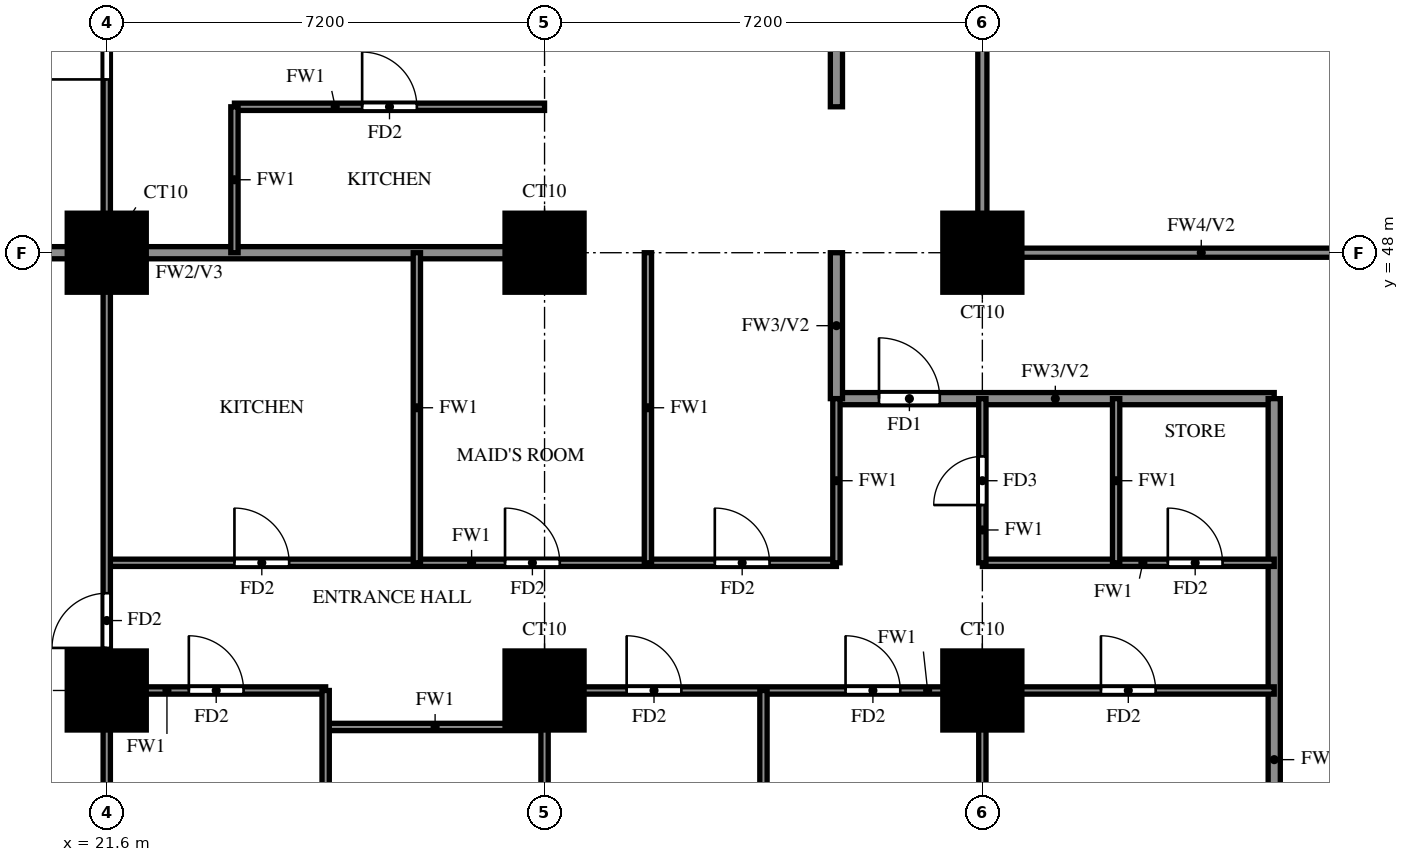
"""IFC4 building model, lengths in metres.
Left out: names, types, materials, properties, quantities, classifications, styles, units other than length and angle.
Written with IfcOpenShell. Run it as: python <this file> out.ifc"""

import sys

from ifc_helpers import new_model, si_unit, direction, frame, frame_2d, origin, origin_2d, place, context, subcontext, project, spatial, rectangle, extrude, source, transform, mapped, element, fill, save


model = new_model("IFC4")
c1 = context("Model", 3, precision=1e-05, world=origin(), true_north=direction((0.0, 1.0)))
c2 = subcontext(c1, "Body", "Model", "MODEL_VIEW")
j1 = project(units=[si_unit("LENGTHUNIT", "METRE"), si_unit("PLANEANGLEUNIT", "RADIAN")], contexts=[c1])
p1 = place(None, origin())
s1 = spatial("IfcSite", under=j1, at=p1, CompositionType="ELEMENT")
p2 = place(p1, origin())
s2 = spatial("IfcBuilding", under=s1, at=p2, CompositionType="ELEMENT")
p3 = place(p2, frame((0.0, 0.0, 76.0)))
s3 = spatial("IfcBuildingStorey", under=s2, at=p3, CompositionType="ELEMENT", Elevation=76.0)
m1 = source(origin(), c2, "Body", "SweptSolid", [
    extrude(rectangle(XDim=1.3, YDim=1.3, at=origin_2d()), origin(), (0.0, 0.0, 1.0), 3.18),
])
for number, where, z_axis, x_axis in (
    (1, (21.6, 40.8, 0.0), (0.0, 0.0, 1.0), (1.0, 0.0, 0.0)),
    (2, (28.8, 40.8, 0.0), (0.0, 0.0, 1.0), (1.0, 0.0, 0.0)),
    (3, (36.0, 40.8, 0.0), (0.0, 0.0, 1.0), (1.0, 0.0, 0.0)),
    (4, (21.6, 48.0, 0.0), (0.0, 0.0, 1.0), (1.0, 0.0, 0.0)),
    (5, (28.8, 48.0, 0.0), (0.0, 0.0, 1.0), (1.0, 0.0, 0.0)),
    (6, (36.0, 48.0, 0.0), (0.0, 0.0, 1.0), (1.0, 0.0, 0.0)),
):
    element("IfcColumn", number, at=place(p3, frame(where, z_axis=z_axis, x_axis=x_axis)), inside=s3, PredefinedType="COLUMN", context=c2, shape_type="MappedRepresentation", body=[
        mapped(m1, transform((0.0, 0.0, 0.0))),
    ])
p4 = place(p3, frame((33.6, 45.6, 0.0), z_axis=(0.0, 0.0, 1.0), x_axis=(1.0, 0.0, 0.0)))
e7 = element("IfcWall", 7, at=p4, inside=s3, PredefinedType="SOLIDWALL", context=c2, shape_type="SweptSolid", body=[
    extrude(rectangle(XDim=7.2, YDim=0.2, at=frame_2d((3.6, 0.0))), origin(), (0.0, 0.0, 1.0), 3.18),
])
p5 = place(p4, frame((0.7, 0.0, 0.0)))
e8 = element("IfcOpeningElement", 8, at=p5, cuts=e7, PredefinedType="OPENING", context=c2, shape_type="SweptSolid", body=[
    extrude(rectangle(XDim=1.0, YDim=2.1, at=frame_2d((0.5, 1.05))), frame((0.0, 0.11, 0.0), z_axis=(0.0, -1.0, 0.0), x_axis=(1.0, 0.0, 0.0)), (0.0, 0.0, 1.0), 0.22),
])
p6 = place(p3, frame((33.6, 45.6, 0.0), z_axis=(0.0, 0.0, 1.0), x_axis=(0.0, 1.0, 0.0)))
e9 = element("IfcWall", 9, at=p6, inside=s3, PredefinedType="SOLIDWALL", context=c2, shape_type="SweptSolid", body=[
    extrude(rectangle(XDim=2.4, YDim=0.2, at=frame_2d((1.2, 0.0))), origin(), (0.0, 0.0, 1.0), 3.18),
])
p7 = place(p3, frame((33.6, 50.4, 0.0), z_axis=(0.0, 0.0, 1.0), x_axis=(0.0, 1.0, 0.0)))
e10 = element("IfcWall", 10, at=p7, inside=s3, PredefinedType="SOLIDWALL", context=c2, shape_type="SweptSolid", body=[
    extrude(rectangle(XDim=9.6, YDim=0.2, at=frame_2d((4.8, 0.0))), origin(), (0.0, 0.0, 1.0), 3.18),
])
p8 = place(p3, frame((40.8, 33.725, 0.0), z_axis=(0.0, 0.0, 1.0), x_axis=(0.0, 1.0, 0.0)))
e11 = element("IfcWall", 11, at=p8, inside=s3, PredefinedType="SOLIDWALL", context=c2, shape_type="SweptSolid", body=[
    extrude(rectangle(XDim=11.875, YDim=0.2, at=frame_2d((5.938, 0.0))), origin(), (0.0, 0.0, 1.0), 2.28),
])
p9 = place(p3, frame((14.525, 48.0, 0.0), z_axis=(0.0, 0.0, 1.0), x_axis=(1.0, 0.0, 0.0)))
e12 = element("IfcWall", 12, at=p9, inside=s3, PredefinedType="SOLIDWALL", context=c2, shape_type="SweptSolid", body=[
    extrude(rectangle(XDim=14.275, YDim=0.2, at=frame_2d((7.138, 0.0))), origin(), (0.0, 0.0, 1.0), 3.18),
])
p10 = place(p3, frame((25.2, 40.2, 0.0), z_axis=(0.0, 0.0, 1.0), x_axis=(1.0, 0.0, 0.0)))
e13 = element("IfcWall", 13, at=p10, inside=s3, PredefinedType="PARTITIONING", context=c2, shape_type="SweptSolid", body=[
    extrude(rectangle(XDim=3.6, YDim=0.12, at=frame_2d((1.8, 0.0))), origin(), (0.0, 0.0, 1.0), 3.18),
])
p11 = place(p3, frame((21.6, 40.8, 0.0), z_axis=(0.0, 0.0, 1.0), x_axis=(1.0, 0.0, 0.0)))
e14 = element("IfcWall", 14, at=p11, inside=s3, PredefinedType="PARTITIONING", context=c2, shape_type="SweptSolid", body=[
    extrude(rectangle(XDim=3.6, YDim=0.12, at=frame_2d((1.8, 0.0))), origin(), (0.0, 0.0, 1.0), 3.18),
])
p12 = place(p11, frame((1.35, 0.0, 0.0)))
e15 = element("IfcOpeningElement", 15, at=p12, cuts=e14, PredefinedType="OPENING", context=c2, shape_type="SweptSolid", body=[
    extrude(rectangle(XDim=0.9, YDim=2.1, at=frame_2d((0.45, 1.05))), frame((0.0, 0.07, 0.0), z_axis=(0.0, -1.0, 0.0), x_axis=(1.0, 0.0, 0.0)), (0.0, 0.0, 1.0), 0.14),
])
p13 = place(p3, frame((28.8, 40.8, 0.0), z_axis=(0.0, 0.0, 1.0), x_axis=(1.0, 0.0, 0.0)))
e16 = element("IfcWall", 16, at=p13, inside=s3, PredefinedType="PARTITIONING", context=c2, shape_type="SweptSolid", body=[
    extrude(rectangle(XDim=12.0, YDim=0.12, at=frame_2d((6.0, 0.0))), origin(), (0.0, 0.0, 1.0), 3.18),
])
p14 = place(p13, frame((1.35, 0.0, 0.0)))
e17 = element("IfcOpeningElement", 17, at=p14, cuts=e16, PredefinedType="OPENING", context=c2, shape_type="SweptSolid", body=[
    extrude(rectangle(XDim=0.9, YDim=2.1, at=frame_2d((0.45, 1.05))), frame((0.0, 0.07, 0.0), z_axis=(0.0, -1.0, 0.0), x_axis=(1.0, 0.0, 0.0)), (0.0, 0.0, 1.0), 0.14),
])
p15 = place(p13, frame((4.95, 0.0, 0.0)))
e18 = element("IfcOpeningElement", 18, at=p15, cuts=e16, PredefinedType="OPENING", context=c2, shape_type="SweptSolid", body=[
    extrude(rectangle(XDim=0.9, YDim=2.1, at=frame_2d((0.45, 1.05))), frame((0.0, 0.07, 0.0), z_axis=(0.0, -1.0, 0.0), x_axis=(1.0, 0.0, 0.0)), (0.0, 0.0, 1.0), 0.14),
])
p16 = place(p13, frame((9.15, 0.0, 0.0)))
e19 = element("IfcOpeningElement", 19, at=p16, cuts=e16, PredefinedType="OPENING", context=c2, shape_type="SweptSolid", body=[
    extrude(rectangle(XDim=0.9, YDim=2.1, at=frame_2d((0.45, 1.05))), frame((0.0, 0.07, 0.0), z_axis=(0.0, -1.0, 0.0), x_axis=(1.0, 0.0, 0.0)), (0.0, 0.0, 1.0), 0.14),
])
p17 = place(p3, frame((21.6, 42.9, 0.0), z_axis=(0.0, 0.0, 1.0), x_axis=(1.0, 0.0, 0.0)))
e20 = element("IfcWall", 20, at=p17, inside=s3, PredefinedType="PARTITIONING", context=c2, shape_type="SweptSolid", body=[
    extrude(rectangle(XDim=12.0, YDim=0.12, at=frame_2d((6.0, 0.0))), origin(), (0.0, 0.0, 1.0), 3.18),
])
p18 = place(p17, frame((2.1, 0.0, 0.0)))
e21 = element("IfcOpeningElement", 21, at=p18, cuts=e20, PredefinedType="OPENING", context=c2, shape_type="SweptSolid", body=[
    extrude(rectangle(XDim=0.9, YDim=2.1, at=frame_2d((0.45, 1.05))), frame((0.0, 0.07, 0.0), z_axis=(0.0, -1.0, 0.0), x_axis=(1.0, 0.0, 0.0)), (0.0, 0.0, 1.0), 0.14),
])
p19 = place(p17, frame((6.55, 0.0, 0.0)))
e22 = element("IfcOpeningElement", 22, at=p19, cuts=e20, PredefinedType="OPENING", context=c2, shape_type="SweptSolid", body=[
    extrude(rectangle(XDim=0.9, YDim=2.1, at=frame_2d((0.45, 1.05))), frame((0.0, 0.07, 0.0), z_axis=(0.0, -1.0, 0.0), x_axis=(1.0, 0.0, 0.0)), (0.0, 0.0, 1.0), 0.14),
])
p20 = place(p17, frame((10.0, 0.0, 0.0)))
e23 = element("IfcOpeningElement", 23, at=p20, cuts=e20, PredefinedType="OPENING", context=c2, shape_type="SweptSolid", body=[
    extrude(rectangle(XDim=0.9, YDim=2.1, at=frame_2d((0.45, 1.05))), frame((0.0, 0.07, 0.0), z_axis=(0.0, -1.0, 0.0), x_axis=(1.0, 0.0, 0.0)), (0.0, 0.0, 1.0), 0.14),
])
p21 = place(p3, frame((36.0, 42.9, 0.0), z_axis=(0.0, 0.0, 1.0), x_axis=(1.0, 0.0, 0.0)))
e24 = element("IfcWall", 24, at=p21, inside=s3, PredefinedType="PARTITIONING", context=c2, shape_type="SweptSolid", body=[
    extrude(rectangle(XDim=4.8, YDim=0.12, at=frame_2d((2.4, 0.0))), origin(), (0.0, 0.0, 1.0), 3.18),
])
p22 = place(p21, frame((3.05, 0.0, 0.0)))
e25 = element("IfcOpeningElement", 25, at=p22, cuts=e24, PredefinedType="OPENING", context=c2, shape_type="SweptSolid", body=[
    extrude(rectangle(XDim=0.9, YDim=2.1, at=frame_2d((0.45, 1.05))), frame((0.0, 0.07, 0.0), z_axis=(0.0, -1.0, 0.0), x_axis=(1.0, 0.0, 0.0)), (0.0, 0.0, 1.0), 0.14),
])
p23 = place(p3, frame((23.7, 50.4, 0.0), z_axis=(0.0, 0.0, 1.0), x_axis=(1.0, 0.0, 0.0)))
e26 = element("IfcWall", 26, at=p23, inside=s3, PredefinedType="PARTITIONING", context=c2, shape_type="SweptSolid", body=[
    extrude(rectangle(XDim=5.1, YDim=0.12, at=frame_2d((2.55, 0.0))), origin(), (0.0, 0.0, 1.0), 3.18),
])
p24 = place(p23, frame((2.1, 0.0, 0.0)))
e27 = element("IfcOpeningElement", 27, at=p24, cuts=e26, PredefinedType="OPENING", context=c2, shape_type="SweptSolid", body=[
    extrude(rectangle(XDim=0.9, YDim=2.1, at=frame_2d((0.45, 1.05))), frame((0.0, 0.07, 0.0), z_axis=(0.0, -1.0, 0.0), x_axis=(1.0, 0.0, 0.0)), (0.0, 0.0, 1.0), 0.14),
])
p25 = place(p3, frame((21.6, 33.725, 0.0), z_axis=(0.0, 0.0, 1.0), x_axis=(0.0, 1.0, 0.0)))
e28 = element("IfcWall", 28, at=p25, inside=s3, PredefinedType="PARTITIONING", context=c2, shape_type="SweptSolid", body=[
    extrude(rectangle(XDim=39.475, YDim=0.12, at=frame_2d((19.737, 0.0))), origin(), (0.0, 0.0, 1.0), 3.18),
])
p26 = place(p25, frame((7.775, 0.0, 0.0)))
e29 = element("IfcOpeningElement", 29, at=p26, cuts=e28, PredefinedType="OPENING", context=c2, shape_type="SweptSolid", body=[
    extrude(rectangle(XDim=0.9, YDim=2.1, at=frame_2d((0.45, 1.05))), frame((0.0, 0.07, 0.0), z_axis=(0.0, -1.0, 0.0), x_axis=(1.0, 0.0, 0.0)), (0.0, 0.0, 1.0), 0.14),
])
p27 = place(p25, frame((17.125, 0.0, 0.0)))
e30 = element("IfcOpeningElement", 30, at=p27, cuts=e28, PredefinedType="OPENING", context=c2, shape_type="SweptSolid", body=[
    extrude(rectangle(XDim=1.5, YDim=2.1, at=frame_2d((0.75, 1.05))), frame((0.0, 0.07, 0.0), z_axis=(0.0, -1.0, 0.0), x_axis=(1.0, 0.0, 0.0)), (0.0, 0.0, 1.0), 0.14),
])
p28 = place(p25, frame((22.825, 0.0, 0.0)))
e31 = element("IfcOpeningElement", 31, at=p28, cuts=e28, PredefinedType="OPENING", context=c2, shape_type="SweptSolid", body=[
    extrude(rectangle(XDim=0.9, YDim=2.1, at=frame_2d((0.45, 1.05))), frame((0.0, 0.07, 0.0), z_axis=(0.0, -1.0, 0.0), x_axis=(1.0, 0.0, 0.0)), (0.0, 0.0, 1.0), 0.14),
])
p29 = place(p25, frame((26.425, 0.0, 0.0)))
e32 = element("IfcOpeningElement", 32, at=p29, cuts=e28, PredefinedType="OPENING", context=c2, shape_type="SweptSolid", body=[
    extrude(rectangle(XDim=0.9, YDim=2.1, at=frame_2d((0.45, 1.05))), frame((0.0, 0.07, 0.0), z_axis=(0.0, -1.0, 0.0), x_axis=(1.0, 0.0, 0.0)), (0.0, 0.0, 1.0), 0.14),
])
p30 = place(p25, frame((30.025, 0.0, 0.0)))
e33 = element("IfcOpeningElement", 33, at=p30, cuts=e28, PredefinedType="OPENING", context=c2, shape_type="SweptSolid", body=[
    extrude(rectangle(XDim=0.9, YDim=2.1, at=frame_2d((0.45, 1.05))), frame((0.0, 0.07, 0.0), z_axis=(0.0, -1.0, 0.0), x_axis=(1.0, 0.0, 0.0)), (0.0, 0.0, 1.0), 0.14),
])
p31 = place(p25, frame((33.625, 0.0, 0.0)))
e34 = element("IfcOpeningElement", 34, at=p31, cuts=e28, PredefinedType="OPENING", context=c2, shape_type="SweptSolid", body=[
    extrude(rectangle(XDim=0.9, YDim=2.1, at=frame_2d((0.45, 1.05))), frame((0.0, 0.07, 0.0), z_axis=(0.0, -1.0, 0.0), x_axis=(1.0, 0.0, 0.0)), (0.0, 0.0, 1.0), 0.14),
])
p32 = place(p25, frame((37.225, 0.0, 0.0)))
e35 = element("IfcOpeningElement", 35, at=p32, cuts=e28, PredefinedType="OPENING", context=c2, shape_type="SweptSolid", body=[
    extrude(rectangle(XDim=0.9, YDim=2.1, at=frame_2d((0.45, 1.05))), frame((0.0, 0.07, 0.0), z_axis=(0.0, -1.0, 0.0), x_axis=(1.0, 0.0, 0.0)), (0.0, 0.0, 1.0), 0.14),
])
p33 = place(p3, frame((23.7, 48.0, 0.0), z_axis=(0.0, 0.0, 1.0), x_axis=(0.0, 1.0, 0.0)))
e36 = element("IfcWall", 36, at=p33, inside=s3, PredefinedType="PARTITIONING", context=c2, shape_type="SweptSolid", body=[
    extrude(rectangle(XDim=2.4, YDim=0.12, at=frame_2d((1.2, 0.0))), origin(), (0.0, 0.0, 1.0), 3.18),
])
p34 = place(p3, frame((25.2, 33.725, 0.0), z_axis=(0.0, 0.0, 1.0), x_axis=(0.0, 1.0, 0.0)))
e37 = element("IfcWall", 37, at=p34, inside=s3, PredefinedType="PARTITIONING", context=c2, shape_type="SweptSolid", body=[
    extrude(rectangle(XDim=7.075, YDim=0.12, at=frame_2d((3.538, 0.0))), origin(), (0.0, 0.0, 1.0), 2.28),
])
p35 = place(p34, frame((2.837, 0.0, 0.0)))
e38 = element("IfcOpeningElement", 38, at=p35, cuts=e37, PredefinedType="OPENING", context=c2, shape_type="SweptSolid", body=[
    extrude(rectangle(XDim=0.8, YDim=2.1, at=frame_2d((0.4, 1.05))), frame((0.0, 0.07, 0.0), z_axis=(0.0, -1.0, 0.0), x_axis=(1.0, 0.0, 0.0)), (0.0, 0.0, 1.0), 0.14),
])
p36 = place(p3, frame((26.7, 42.9, 0.0), z_axis=(0.0, 0.0, 1.0), x_axis=(0.0, 1.0, 0.0)))
e39 = element("IfcWall", 39, at=p36, inside=s3, PredefinedType="PARTITIONING", context=c2, shape_type="SweptSolid", body=[
    extrude(rectangle(XDim=5.1, YDim=0.12, at=frame_2d((2.55, 0.0))), origin(), (0.0, 0.0, 1.0), 3.18),
])
p37 = place(p3, frame((28.8, 33.725, 0.0), z_axis=(0.0, 0.0, 1.0), x_axis=(0.0, 1.0, 0.0)))
e40 = element("IfcWall", 40, at=p37, inside=s3, PredefinedType="PARTITIONING", context=c2, shape_type="SweptSolid", body=[
    extrude(rectangle(XDim=7.075, YDim=0.12, at=frame_2d((3.538, 0.0))), origin(), (0.0, 0.0, 1.0), 3.18),
])
p38 = place(p3, frame((30.5, 42.9, 0.0), z_axis=(0.0, 0.0, 1.0), x_axis=(0.0, 1.0, 0.0)))
e41 = element("IfcWall", 41, at=p38, inside=s3, PredefinedType="PARTITIONING", context=c2, shape_type="SweptSolid", body=[
    extrude(rectangle(XDim=5.1, YDim=0.12, at=frame_2d((2.55, 0.0))), origin(), (0.0, 0.0, 1.0), 3.18),
])
p39 = place(p3, frame((32.4, 33.725, 0.0), z_axis=(0.0, 0.0, 1.0), x_axis=(0.0, 1.0, 0.0)))
e42 = element("IfcWall", 42, at=p39, inside=s3, PredefinedType="PARTITIONING", context=c2, shape_type="SweptSolid", body=[
    extrude(rectangle(XDim=7.075, YDim=0.12, at=frame_2d((3.538, 0.0))), origin(), (0.0, 0.0, 1.0), 2.28),
])
p40 = place(p3, frame((33.6, 42.9, 0.0), z_axis=(0.0, 0.0, 1.0), x_axis=(0.0, 1.0, 0.0)))
e43 = element("IfcWall", 43, at=p40, inside=s3, PredefinedType="PARTITIONING", context=c2, shape_type="SweptSolid", body=[
    extrude(rectangle(XDim=2.7, YDim=0.12, at=frame_2d((1.35, 0.0))), origin(), (0.0, 0.0, 1.0), 3.18),
])
p41 = place(p3, frame((36.0, 33.725, 0.0), z_axis=(0.0, 0.0, 1.0), x_axis=(0.0, 1.0, 0.0)))
e44 = element("IfcWall", 44, at=p41, inside=s3, PredefinedType="PARTITIONING", context=c2, shape_type="SweptSolid", body=[
    extrude(rectangle(XDim=7.075, YDim=0.12, at=frame_2d((3.538, 0.0))), origin(), (0.0, 0.0, 1.0), 3.18),
])
p42 = place(p3, frame((36.0, 42.9, 0.0), z_axis=(0.0, 0.0, 1.0), x_axis=(0.0, 1.0, 0.0)))
e45 = element("IfcWall", 45, at=p42, inside=s3, PredefinedType="PARTITIONING", context=c2, shape_type="SweptSolid", body=[
    extrude(rectangle(XDim=2.7, YDim=0.12, at=frame_2d((1.35, 0.0))), origin(), (0.0, 0.0, 1.0), 3.18),
])
p43 = place(p42, frame((0.95, 0.0, 0.0)))
e46 = element("IfcOpeningElement", 46, at=p43, cuts=e45, PredefinedType="OPENING", context=c2, shape_type="SweptSolid", body=[
    extrude(rectangle(XDim=0.8, YDim=2.1, at=frame_2d((0.4, 1.05))), frame((0.0, 0.07, 0.0), z_axis=(0.0, -1.0, 0.0), x_axis=(1.0, 0.0, 0.0)), (0.0, 0.0, 1.0), 0.14),
])
p44 = place(p3, frame((38.2, 42.9, 0.0), z_axis=(0.0, 0.0, 1.0), x_axis=(0.0, 1.0, 0.0)))
e47 = element("IfcWall", 47, at=p44, inside=s3, PredefinedType="PARTITIONING", context=c2, shape_type="SweptSolid", body=[
    extrude(rectangle(XDim=2.7, YDim=0.12, at=frame_2d((1.35, 0.0))), origin(), (0.0, 0.0, 1.0), 3.18),
])
p45 = place(p3, frame((36.0, 48.0, 0.0), z_axis=(0.0, 0.0, 1.0), x_axis=(1.0, 0.0, 0.0)))
e48 = element("IfcWall", 48, at=p45, inside=s3, PredefinedType="SOLIDWALL", context=c2, shape_type="SweptSolid", body=[
    extrude(rectangle(XDim=7.2, YDim=0.15, at=frame_2d((3.6, 0.0))), origin(), (0.0, 0.0, 1.0), 2.28),
])
p46 = place(p3, frame((36.0, 48.0, 0.0), z_axis=(0.0, 0.0, 1.0), x_axis=(0.0, 1.0, 0.0)))
e49 = element("IfcWall", 49, at=p46, inside=s3, PredefinedType="SOLIDWALL", context=c2, shape_type="SweptSolid", body=[
    extrude(rectangle(XDim=14.4, YDim=0.15, at=frame_2d((7.2, 0.0))), origin(), (0.0, 0.0, 1.0), 2.28),
])
p47 = place(p5, origin())
e50 = element("IfcDoor", 50, at=p47, inside=s3, OperationType="SINGLE_SWING_LEFT", PredefinedType="DOOR", context=c2, shape_type="SweptSolid", body=[
    extrude(rectangle(XDim=1.0, YDim=2.1, at=frame_2d((0.5, 1.05))), frame((0.0, 0.025, 0.0), z_axis=(0.0, -1.0, 0.0), x_axis=(1.0, 0.0, 0.0)), (0.0, 0.0, 1.0), 0.05),
])
fill(e8, e50)
p48 = place(p26, origin())
e51 = element("IfcDoor", 51, at=p48, inside=s3, OperationType="SINGLE_SWING_RIGHT", PredefinedType="DOOR", context=c2, shape_type="SweptSolid", body=[
    extrude(rectangle(XDim=0.9, YDim=2.1, at=frame_2d((0.45, 1.05))), frame((0.0, 0.025, 0.0), z_axis=(0.0, -1.0, 0.0), x_axis=(1.0, 0.0, 0.0)), (0.0, 0.0, 1.0), 0.05),
])
fill(e29, e51)
p49 = place(p12, origin())
e52 = element("IfcDoor", 52, at=p49, inside=s3, OperationType="SINGLE_SWING_RIGHT", PredefinedType="DOOR", context=c2, shape_type="SweptSolid", body=[
    extrude(rectangle(XDim=0.9, YDim=2.1, at=frame_2d((0.45, 1.05))), frame((0.0, 0.025, 0.0), z_axis=(0.0, -1.0, 0.0), x_axis=(1.0, 0.0, 0.0)), (0.0, 0.0, 1.0), 0.05),
])
fill(e15, e52)
p50 = place(p14, origin())
e53 = element("IfcDoor", 53, at=p50, inside=s3, OperationType="SINGLE_SWING_LEFT", PredefinedType="DOOR", context=c2, shape_type="SweptSolid", body=[
    extrude(rectangle(XDim=0.9, YDim=2.1, at=frame_2d((0.45, 1.05))), frame((0.0, 0.025, 0.0), z_axis=(0.0, -1.0, 0.0), x_axis=(1.0, 0.0, 0.0)), (0.0, 0.0, 1.0), 0.05),
])
fill(e17, e53)
p51 = place(p15, origin())
e54 = element("IfcDoor", 54, at=p51, inside=s3, OperationType="SINGLE_SWING_RIGHT", PredefinedType="DOOR", context=c2, shape_type="SweptSolid", body=[
    extrude(rectangle(XDim=0.9, YDim=2.1, at=frame_2d((0.45, 1.05))), frame((0.0, 0.025, 0.0), z_axis=(0.0, -1.0, 0.0), x_axis=(1.0, 0.0, 0.0)), (0.0, 0.0, 1.0), 0.05),
])
fill(e18, e54)
p52 = place(p16, origin())
e55 = element("IfcDoor", 55, at=p52, inside=s3, OperationType="SINGLE_SWING_LEFT", PredefinedType="DOOR", context=c2, shape_type="SweptSolid", body=[
    extrude(rectangle(XDim=0.9, YDim=2.1, at=frame_2d((0.45, 1.05))), frame((0.0, 0.025, 0.0), z_axis=(0.0, -1.0, 0.0), x_axis=(1.0, 0.0, 0.0)), (0.0, 0.0, 1.0), 0.05),
])
fill(e19, e55)
p53 = place(p18, origin())
e56 = element("IfcDoor", 56, at=p53, inside=s3, OperationType="SINGLE_SWING_LEFT", PredefinedType="DOOR", context=c2, shape_type="SweptSolid", body=[
    extrude(rectangle(XDim=0.9, YDim=2.1, at=frame_2d((0.45, 1.05))), frame((0.0, 0.025, 0.0), z_axis=(0.0, -1.0, 0.0), x_axis=(1.0, 0.0, 0.0)), (0.0, 0.0, 1.0), 0.05),
])
fill(e21, e56)
p54 = place(p19, origin())
e57 = element("IfcDoor", 57, at=p54, inside=s3, OperationType="SINGLE_SWING_RIGHT", PredefinedType="DOOR", context=c2, shape_type="SweptSolid", body=[
    extrude(rectangle(XDim=0.9, YDim=2.1, at=frame_2d((0.45, 1.05))), frame((0.0, 0.025, 0.0), z_axis=(0.0, -1.0, 0.0), x_axis=(1.0, 0.0, 0.0)), (0.0, 0.0, 1.0), 0.05),
])
fill(e22, e57)
p55 = place(p20, origin())
e58 = element("IfcDoor", 58, at=p55, inside=s3, OperationType="SINGLE_SWING_LEFT", PredefinedType="DOOR", context=c2, shape_type="SweptSolid", body=[
    extrude(rectangle(XDim=0.9, YDim=2.1, at=frame_2d((0.45, 1.05))), frame((0.0, 0.025, 0.0), z_axis=(0.0, -1.0, 0.0), x_axis=(1.0, 0.0, 0.0)), (0.0, 0.0, 1.0), 0.05),
])
fill(e23, e58)
p56 = place(p43, origin())
e59 = element("IfcDoor", 59, at=p56, inside=s3, OperationType="SINGLE_SWING_LEFT", PredefinedType="DOOR", context=c2, shape_type="SweptSolid", body=[
    extrude(rectangle(XDim=0.8, YDim=2.1, at=frame_2d((0.4, 1.05))), frame((0.0, 0.025, 0.0), z_axis=(0.0, -1.0, 0.0), x_axis=(1.0, 0.0, 0.0)), (0.0, 0.0, 1.0), 0.05),
])
fill(e46, e59)
p57 = place(p22, origin())
e60 = element("IfcDoor", 60, at=p57, inside=s3, OperationType="SINGLE_SWING_RIGHT", PredefinedType="DOOR", context=c2, shape_type="SweptSolid", body=[
    extrude(rectangle(XDim=0.9, YDim=2.1, at=frame_2d((0.45, 1.05))), frame((0.0, 0.025, 0.0), z_axis=(0.0, -1.0, 0.0), x_axis=(1.0, 0.0, 0.0)), (0.0, 0.0, 1.0), 0.05),
])
fill(e25, e60)
p58 = place(p27, origin())
e61 = element("IfcDoor", 61, at=p58, inside=s3, OperationType="SINGLE_SWING_LEFT", PredefinedType="DOOR", context=c2, shape_type="SweptSolid", body=[
    extrude(rectangle(XDim=1.5, YDim=2.1, at=frame_2d((0.75, 1.05))), frame((0.0, 0.025, 0.0), z_axis=(0.0, -1.0, 0.0), x_axis=(1.0, 0.0, 0.0)), (0.0, 0.0, 1.0), 0.05),
])
fill(e30, e61)
p59 = place(p24, origin())
e62 = element("IfcDoor", 62, at=p59, inside=s3, OperationType="SINGLE_SWING_LEFT", PredefinedType="DOOR", context=c2, shape_type="SweptSolid", body=[
    extrude(rectangle(XDim=0.9, YDim=2.1, at=frame_2d((0.45, 1.05))), frame((0.0, 0.025, 0.0), z_axis=(0.0, -1.0, 0.0), x_axis=(1.0, 0.0, 0.0)), (0.0, 0.0, 1.0), 0.05),
])
fill(e27, e62)
save(model, sys.argv[1])
